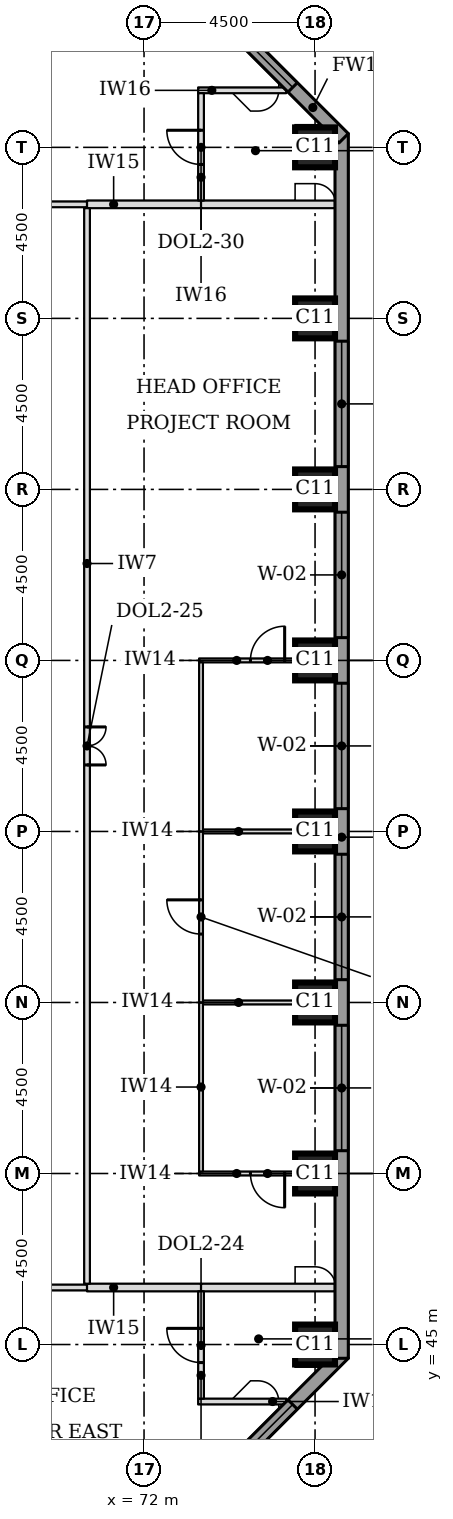
"""IFC4 building model, lengths in metres.
Left out: names, types, materials, properties, quantities, classifications, styles, units other than length and angle.
Written with IfcOpenShell. Run it as: python <this file> out.ifc"""

import sys

from ifc_helpers import new_model, si_unit, direction, frame, frame_2d, origin, origin_2d, place, context, subcontext, project, spatial, rectangle, extrude, element, fill, save


model = new_model("IFC4")
c1 = context("Model", 3, precision=1e-05, world=origin(), true_north=direction((0.0, 1.0)))
c2 = subcontext(c1, "Body", "Model", "MODEL_VIEW")
j1 = project(units=[si_unit("LENGTHUNIT", "METRE"), si_unit("PLANEANGLEUNIT", "RADIAN")], contexts=[c1])
p1 = place(None, origin())
s1 = spatial("IfcSite", under=j1, at=p1, CompositionType="ELEMENT")
p2 = place(p1, origin())
s2 = spatial("IfcBuilding", under=s1, at=p2, CompositionType="ELEMENT")
p3 = place(p2, frame((0.0, 0.0, 86.3)))
s3 = spatial("IfcBuildingStorey", under=s2, at=p3, CompositionType="ELEMENT", Elevation=86.3)
for number, where, z_axis, x_axis in (
    (1, (76.5, 45.0, 0.0), (0.0, 0.0, 1.0), (1.0, 0.0, 0.0)),
    (2, (76.5, 49.5, 0.0), (0.0, 0.0, 1.0), (1.0, 0.0, 0.0)),
    (3, (76.5, 54.0, 0.0), (0.0, 0.0, 1.0), (1.0, 0.0, 0.0)),
    (4, (76.5, 58.5, 0.0), (0.0, 0.0, 1.0), (1.0, 0.0, 0.0)),
    (5, (76.5, 63.0, 0.0), (0.0, 0.0, 1.0), (1.0, 0.0, 0.0)),
    (6, (76.5, 67.5, 0.0), (0.0, 0.0, 1.0), (1.0, 0.0, 0.0)),
    (7, (76.5, 72.0, 0.0), (0.0, 0.0, 1.0), (1.0, 0.0, 0.0)),
    (8, (76.5, 76.5, 0.0), (0.0, 0.0, 1.0), (1.0, 0.0, 0.0)),
):
    element("IfcColumn", number, at=place(p3, frame(where, z_axis=z_axis, x_axis=x_axis)), inside=s3, PredefinedType="COLUMN", context=c2, shape_type="SweptSolid", body=[
        extrude(rectangle(XDim=1.05, YDim=1.05, at=origin_2d()), origin(), (0.0, 0.0, 1.0), 3.7),
    ])
p4 = place(p3, frame((72.239, 39.749, 0.0), z_axis=(0.0, 0.0, 1.0), x_axis=(0.707106781187, 0.707106781187, 0.0)))
e9 = element("IfcWall", 9, at=p4, inside=s3, PredefinedType="STANDARD", context=c2, shape_type="SweptSolid", body=[
    extrude(rectangle(XDim=7.089, YDim=0.35, at=frame_2d((3.544, 0.0))), origin(), (0.0, 0.0, 1.0), 3.525),
])
p5 = place(p4, frame((1.894, 0.0, 0.9)))
e10 = element("IfcOpeningElement", 10, at=p5, cuts=e9, PredefinedType="OPENING", context=c2, shape_type="SweptSolid", body=[
    extrude(rectangle(XDim=3.3, YDim=1.9, at=frame_2d((1.65, 0.95))), frame((0.0, 0.185, 0.0), z_axis=(0.0, -1.0, 0.0), x_axis=(1.0, 0.0, 0.0)), (0.0, 0.0, 1.0), 0.37),
])
p6 = place(p3, frame((77.2, 44.638, 0.0), z_axis=(0.0, 0.0, 1.0), x_axis=(0.0, 1.0, 0.0)))
e11 = element("IfcWall", 11, at=p6, inside=s3, PredefinedType="STANDARD", context=c2, shape_type="SweptSolid", body=[
    extrude(rectangle(XDim=32.225, YDim=0.35, at=frame_2d((16.112, 0.0))), origin(), (0.0, 0.0, 1.0), 3.525),
])
p7 = place(p6, frame((5.462, 0.0, 0.9)))
e12 = element("IfcOpeningElement", 12, at=p7, cuts=e11, PredefinedType="OPENING", context=c2, shape_type="SweptSolid", body=[
    extrude(rectangle(XDim=3.3, YDim=1.9, at=frame_2d((1.65, 0.95))), frame((0.0, 0.185, 0.0), z_axis=(0.0, -1.0, 0.0), x_axis=(1.0, 0.0, 0.0)), (0.0, 0.0, 1.0), 0.37),
])
p8 = place(p6, frame((9.962, 0.0, 0.9)))
e13 = element("IfcOpeningElement", 13, at=p8, cuts=e11, PredefinedType="OPENING", context=c2, shape_type="SweptSolid", body=[
    extrude(rectangle(XDim=3.3, YDim=1.9, at=frame_2d((1.65, 0.95))), frame((0.0, 0.185, 0.0), z_axis=(0.0, -1.0, 0.0), x_axis=(1.0, 0.0, 0.0)), (0.0, 0.0, 1.0), 0.37),
])
p9 = place(p6, frame((14.462, 0.0, 0.9)))
e14 = element("IfcOpeningElement", 14, at=p9, cuts=e11, PredefinedType="OPENING", context=c2, shape_type="SweptSolid", body=[
    extrude(rectangle(XDim=3.3, YDim=1.9, at=frame_2d((1.65, 0.95))), frame((0.0, 0.185, 0.0), z_axis=(0.0, -1.0, 0.0), x_axis=(1.0, 0.0, 0.0)), (0.0, 0.0, 1.0), 0.37),
])
p10 = place(p6, frame((18.962, 0.0, 0.9)))
e15 = element("IfcOpeningElement", 15, at=p10, cuts=e11, PredefinedType="OPENING", context=c2, shape_type="SweptSolid", body=[
    extrude(rectangle(XDim=3.3, YDim=1.9, at=frame_2d((1.65, 0.95))), frame((0.0, 0.185, 0.0), z_axis=(0.0, -1.0, 0.0), x_axis=(1.0, 0.0, 0.0)), (0.0, 0.0, 1.0), 0.37),
])
p11 = place(p6, frame((23.462, 0.0, 0.9)))
e16 = element("IfcOpeningElement", 16, at=p11, cuts=e11, PredefinedType="OPENING", context=c2, shape_type="SweptSolid", body=[
    extrude(rectangle(XDim=3.3, YDim=1.9, at=frame_2d((1.65, 0.95))), frame((0.0, 0.185, 0.0), z_axis=(0.0, -1.0, 0.0), x_axis=(1.0, 0.0, 0.0)), (0.0, 0.0, 1.0), 0.37),
])
p12 = place(p3, frame((77.251, 76.739, 0.0), z_axis=(0.0, 0.0, 1.0), x_axis=(-0.707106781187, 0.707106781187, 0.0)))
e17 = element("IfcWall", 17, at=p12, inside=s3, PredefinedType="STANDARD", context=c2, shape_type="SweptSolid", body=[
    extrude(rectangle(XDim=7.089, YDim=0.35, at=frame_2d((3.544, 0.0))), origin(), (0.0, 0.0, 1.0), 3.525),
])
p13 = place(p12, frame((1.894, 0.0, 0.9)))
e18 = element("IfcOpeningElement", 18, at=p13, cuts=e17, PredefinedType="OPENING", context=c2, shape_type="SweptSolid", body=[
    extrude(rectangle(XDim=3.3, YDim=1.9, at=frame_2d((1.65, 0.95))), frame((0.0, 0.185, 0.0), z_axis=(0.0, -1.0, 0.0), x_axis=(1.0, 0.0, 0.0)), (0.0, 0.0, 1.0), 0.37),
])
p14 = place(p3, frame((73.425, 43.5, 0.0), z_axis=(0.0, 0.0, 1.0), x_axis=(1.0, 0.0, 0.0)))
e19 = element("IfcWall", 19, at=p14, inside=s3, PredefinedType="PARTITIONING", context=c2, shape_type="SweptSolid", body=[
    extrude(rectangle(XDim=2.317, YDim=0.15, at=frame_2d((1.159, 0.0))), origin(), (0.0, 0.0, 1.0), 3.55),
])
p15 = place(p3, frame((60.0, 46.5, 0.0), z_axis=(0.0, 0.0, 1.0), x_axis=(1.0, 0.0, 0.0)))
e20 = element("IfcWall", 20, at=p15, inside=s3, PredefinedType="PARTITIONING", context=c2, shape_type="SweptSolid", body=[
    extrude(rectangle(XDim=10.5, YDim=0.15, at=frame_2d((5.25, 0.0))), origin(), (0.0, 0.0, 1.0), 3.55),
])
p16 = place(p3, frame((70.5, 46.5, 0.0), z_axis=(0.0, 0.0, 1.0), x_axis=(1.0, 0.0, 0.0)))
e21 = element("IfcWall", 21, at=p16, inside=s3, PredefinedType="PARTITIONING", context=c2, shape_type="SweptSolid", body=[
    extrude(rectangle(XDim=3.0, YDim=0.2, at=frame_2d((1.5, 0.0))), origin(), (0.0, 0.0, 1.0), 3.55),
])
p17 = place(p3, frame((73.5, 46.5, 0.0), z_axis=(0.0, 0.0, 1.0), x_axis=(1.0, 0.0, 0.0)))
e22 = element("IfcWall", 22, at=p17, inside=s3, PredefinedType="PARTITIONING", context=c2, shape_type="SweptSolid", body=[
    extrude(rectangle(XDim=3.525, YDim=0.2, at=frame_2d((1.762, 0.0))), origin(), (0.0, 0.0, 1.0), 3.55),
])
p18 = place(p3, frame((73.45, 49.5, 0.0), z_axis=(0.0, 0.0, 1.0), x_axis=(1.0, 0.0, 0.0)))
e23 = element("IfcWall", 23, at=p18, inside=s3, PredefinedType="PARTITIONING", context=c2, shape_type="SweptSolid", body=[
    extrude(rectangle(XDim=3.575, YDim=0.1, at=frame_2d((1.788, 0.0))), origin(), (0.0, 0.0, 1.0), 3.55),
])
p19 = place(p18, frame((1.35, 0.0, 0.0)))
e24 = element("IfcOpeningElement", 24, at=p19, cuts=e23, PredefinedType="OPENING", context=c2, shape_type="SweptSolid", body=[
    extrude(rectangle(XDim=0.9, YDim=2.1, at=frame_2d((0.45, 1.05))), frame((0.0, 0.06, 0.0), z_axis=(0.0, -1.0, 0.0), x_axis=(1.0, 0.0, 0.0)), (0.0, 0.0, 1.0), 0.12),
])
for number, where, z_axis, x_axis in (
    (25, (73.55, 54.0, 0.0), (0.0, 0.0, 1.0), (1.0, 0.0, 0.0)),
    (26, (73.55, 58.5, 0.0), (0.0, 0.0, 1.0), (1.0, 0.0, 0.0)),
):
    element("IfcWall", number, at=place(p3, frame(where, z_axis=z_axis, x_axis=x_axis)), inside=s3, PredefinedType="PARTITIONING", context=c2, shape_type="SweptSolid", body=[
        extrude(rectangle(XDim=3.475, YDim=0.1, at=frame_2d((1.737, 0.0))), origin(), (0.0, 0.0, 1.0), 3.55),
    ])
p20 = place(p3, frame((73.45, 63.0, 0.0), z_axis=(0.0, 0.0, 1.0), x_axis=(1.0, 0.0, 0.0)))
e27 = element("IfcWall", 27, at=p20, inside=s3, PredefinedType="PARTITIONING", context=c2, shape_type="SweptSolid", body=[
    extrude(rectangle(XDim=3.575, YDim=0.1, at=frame_2d((1.788, 0.0))), origin(), (0.0, 0.0, 1.0), 3.55),
])
p21 = place(p20, frame((1.35, 0.0, 0.0)))
e28 = element("IfcOpeningElement", 28, at=p21, cuts=e27, PredefinedType="OPENING", context=c2, shape_type="SweptSolid", body=[
    extrude(rectangle(XDim=0.9, YDim=2.1, at=frame_2d((0.45, 1.05))), frame((0.0, 0.06, 0.0), z_axis=(0.0, -1.0, 0.0), x_axis=(1.0, 0.0, 0.0)), (0.0, 0.0, 1.0), 0.12),
])
p22 = place(p3, frame((46.5, 75.0, 0.0), z_axis=(0.0, 0.0, 1.0), x_axis=(1.0, 0.0, 0.0)))
e29 = element("IfcWall", 29, at=p22, inside=s3, PredefinedType="PARTITIONING", context=c2, shape_type="SweptSolid", body=[
    extrude(rectangle(XDim=24.0, YDim=0.15, at=frame_2d((12.0, 0.0))), origin(), (0.0, 0.0, 1.0), 3.55),
])
p23 = place(p3, frame((70.5, 75.0, 0.0), z_axis=(0.0, 0.0, 1.0), x_axis=(1.0, 0.0, 0.0)))
e30 = element("IfcWall", 30, at=p23, inside=s3, PredefinedType="PARTITIONING", context=c2, shape_type="SweptSolid", body=[
    extrude(rectangle(XDim=3.0, YDim=0.2, at=frame_2d((1.5, 0.0))), origin(), (0.0, 0.0, 1.0), 3.55),
])
p24 = place(p3, frame((73.5, 75.0, 0.0), z_axis=(0.0, 0.0, 1.0), x_axis=(1.0, 0.0, 0.0)))
e31 = element("IfcWall", 31, at=p24, inside=s3, PredefinedType="PARTITIONING", context=c2, shape_type="SweptSolid", body=[
    extrude(rectangle(XDim=3.525, YDim=0.2, at=frame_2d((1.762, 0.0))), origin(), (0.0, 0.0, 1.0), 3.55),
])
p25 = place(p3, frame((73.425, 78.0, 0.0), z_axis=(0.0, 0.0, 1.0), x_axis=(1.0, 0.0, 0.0)))
e32 = element("IfcWall", 32, at=p25, inside=s3, PredefinedType="PARTITIONING", context=c2, shape_type="SweptSolid", body=[
    extrude(rectangle(XDim=2.317, YDim=0.15, at=frame_2d((1.159, 0.0))), origin(), (0.0, 0.0, 1.0), 3.55),
])
p26 = place(p3, frame((73.5, 43.575, 0.0), z_axis=(0.0, 0.0, 1.0), x_axis=(0.0, 1.0, 0.0)))
e33 = element("IfcWall", 33, at=p26, inside=s3, PredefinedType="PARTITIONING", context=c2, shape_type="SweptSolid", body=[
    extrude(rectangle(XDim=2.825, YDim=0.15, at=frame_2d((1.413, 0.0))), origin(), (0.0, 0.0, 1.0), 3.55),
])
p27 = place(p26, frame((0.95, 0.0, 0.0)))
e34 = element("IfcOpeningElement", 34, at=p27, cuts=e33, PredefinedType="OPENING", context=c2, shape_type="SweptSolid", body=[
    extrude(rectangle(XDim=0.9, YDim=2.1, at=frame_2d((0.45, 1.05))), frame((0.0, 0.085, 0.0), z_axis=(0.0, -1.0, 0.0), x_axis=(1.0, 0.0, 0.0)), (0.0, 0.0, 1.0), 0.17),
])
p28 = place(p3, frame((70.5, 46.6, 0.0), z_axis=(0.0, 0.0, 1.0), x_axis=(0.0, 1.0, 0.0)))
e35 = element("IfcWall", 35, at=p28, inside=s3, PredefinedType="PARTITIONING", context=c2, shape_type="SweptSolid", body=[
    extrude(rectangle(XDim=28.3, YDim=0.15, at=frame_2d((14.15, 0.0))), origin(), (0.0, 0.0, 1.0), 3.55),
])
p29 = place(p28, frame((13.65, 0.0, 0.0)))
e36 = element("IfcOpeningElement", 36, at=p29, cuts=e35, PredefinedType="OPENING", context=c2, shape_type="SweptSolid", body=[
    extrude(rectangle(XDim=1.0, YDim=2.1, at=frame_2d((0.5, 1.05))), frame((0.0, 0.085, 0.0), z_axis=(0.0, -1.0, 0.0), x_axis=(1.0, 0.0, 0.0)), (0.0, 0.0, 1.0), 0.17),
])
p30 = place(p3, frame((73.5, 49.55, 0.0), z_axis=(0.0, 0.0, 1.0), x_axis=(0.0, 1.0, 0.0)))
e37 = element("IfcWall", 37, at=p30, inside=s3, PredefinedType="PARTITIONING", context=c2, shape_type="SweptSolid", body=[
    extrude(rectangle(XDim=4.45, YDim=0.1, at=frame_2d((2.225, 0.0))), origin(), (0.0, 0.0, 1.0), 3.55),
])
p31 = place(p3, frame((73.5, 54.0, 0.0), z_axis=(0.0, 0.0, 1.0), x_axis=(0.0, 1.0, 0.0)))
e38 = element("IfcWall", 38, at=p31, inside=s3, PredefinedType="PARTITIONING", context=c2, shape_type="SweptSolid", body=[
    extrude(rectangle(XDim=4.5, YDim=0.1, at=frame_2d((2.25, 0.0))), origin(), (0.0, 0.0, 1.0), 3.55),
])
p32 = place(p31, frame((1.8, 0.0, 0.0)))
e39 = element("IfcOpeningElement", 39, at=p32, cuts=e38, PredefinedType="OPENING", context=c2, shape_type="SweptSolid", body=[
    extrude(rectangle(XDim=0.9, YDim=2.1, at=frame_2d((0.45, 1.05))), frame((0.0, 0.06, 0.0), z_axis=(0.0, -1.0, 0.0), x_axis=(1.0, 0.0, 0.0)), (0.0, 0.0, 1.0), 0.12),
])
p33 = place(p3, frame((73.5, 58.5, 0.0), z_axis=(0.0, 0.0, 1.0), x_axis=(0.0, 1.0, 0.0)))
e40 = element("IfcWall", 40, at=p33, inside=s3, PredefinedType="PARTITIONING", context=c2, shape_type="SweptSolid", body=[
    extrude(rectangle(XDim=4.45, YDim=0.1, at=frame_2d((2.225, 0.0))), origin(), (0.0, 0.0, 1.0), 3.55),
])
p34 = place(p3, frame((73.5, 75.1, 0.0), z_axis=(0.0, 0.0, 1.0), x_axis=(0.0, 1.0, 0.0)))
e41 = element("IfcWall", 41, at=p34, inside=s3, PredefinedType="PARTITIONING", context=c2, shape_type="SweptSolid", body=[
    extrude(rectangle(XDim=2.825, YDim=0.15, at=frame_2d((1.413, 0.0))), origin(), (0.0, 0.0, 1.0), 3.55),
])
p35 = place(p34, frame((0.95, 0.0, 0.0)))
e42 = element("IfcOpeningElement", 42, at=p35, cuts=e41, PredefinedType="OPENING", context=c2, shape_type="SweptSolid", body=[
    extrude(rectangle(XDim=0.9, YDim=2.1, at=frame_2d((0.45, 1.05))), frame((0.0, 0.085, 0.0), z_axis=(0.0, -1.0, 0.0), x_axis=(1.0, 0.0, 0.0)), (0.0, 0.0, 1.0), 0.17),
])
p36 = place(p5, origin())
e43 = element("IfcWindow", 43, at=p36, inside=s3, PartitioningType="SINGLE_PANEL", PredefinedType="WINDOW", context=c2, shape_type="SweptSolid", body=[
    extrude(rectangle(XDim=3.3, YDim=1.9, at=frame_2d((1.65, 0.95))), frame((0.0, 0.085, 0.0), z_axis=(0.0, -1.0, 0.0), x_axis=(1.0, 0.0, 0.0)), (0.0, 0.0, 1.0), 0.06),
])
fill(e10, e43)
p37 = place(p7, origin())
e44 = element("IfcWindow", 44, at=p37, inside=s3, PartitioningType="SINGLE_PANEL", PredefinedType="WINDOW", context=c2, shape_type="SweptSolid", body=[
    extrude(rectangle(XDim=3.3, YDim=1.9, at=frame_2d((1.65, 0.95))), frame((0.0, 0.085, 0.0), z_axis=(0.0, -1.0, 0.0), x_axis=(1.0, 0.0, 0.0)), (0.0, 0.0, 1.0), 0.06),
])
fill(e12, e44)
p38 = place(p8, origin())
e45 = element("IfcWindow", 45, at=p38, inside=s3, PartitioningType="SINGLE_PANEL", PredefinedType="WINDOW", context=c2, shape_type="SweptSolid", body=[
    extrude(rectangle(XDim=3.3, YDim=1.9, at=frame_2d((1.65, 0.95))), frame((0.0, 0.085, 0.0), z_axis=(0.0, -1.0, 0.0), x_axis=(1.0, 0.0, 0.0)), (0.0, 0.0, 1.0), 0.06),
])
fill(e13, e45)
p39 = place(p9, origin())
e46 = element("IfcWindow", 46, at=p39, inside=s3, PartitioningType="SINGLE_PANEL", PredefinedType="WINDOW", context=c2, shape_type="SweptSolid", body=[
    extrude(rectangle(XDim=3.3, YDim=1.9, at=frame_2d((1.65, 0.95))), frame((0.0, 0.085, 0.0), z_axis=(0.0, -1.0, 0.0), x_axis=(1.0, 0.0, 0.0)), (0.0, 0.0, 1.0), 0.06),
])
fill(e14, e46)
p40 = place(p10, origin())
e47 = element("IfcWindow", 47, at=p40, inside=s3, PartitioningType="SINGLE_PANEL", PredefinedType="WINDOW", context=c2, shape_type="SweptSolid", body=[
    extrude(rectangle(XDim=3.3, YDim=1.9, at=frame_2d((1.65, 0.95))), frame((0.0, 0.085, 0.0), z_axis=(0.0, -1.0, 0.0), x_axis=(1.0, 0.0, 0.0)), (0.0, 0.0, 1.0), 0.06),
])
fill(e15, e47)
p41 = place(p11, origin())
e48 = element("IfcWindow", 48, at=p41, inside=s3, PartitioningType="SINGLE_PANEL", PredefinedType="WINDOW", context=c2, shape_type="SweptSolid", body=[
    extrude(rectangle(XDim=3.3, YDim=1.9, at=frame_2d((1.65, 0.95))), frame((0.0, 0.085, 0.0), z_axis=(0.0, -1.0, 0.0), x_axis=(1.0, 0.0, 0.0)), (0.0, 0.0, 1.0), 0.06),
])
fill(e16, e48)
p42 = place(p13, origin())
e49 = element("IfcWindow", 49, at=p42, inside=s3, PartitioningType="SINGLE_PANEL", PredefinedType="WINDOW", context=c2, shape_type="SweptSolid", body=[
    extrude(rectangle(XDim=3.3, YDim=1.9, at=frame_2d((1.65, 0.95))), frame((0.0, 0.085, 0.0), z_axis=(0.0, -1.0, 0.0), x_axis=(1.0, 0.0, 0.0)), (0.0, 0.0, 1.0), 0.06),
])
fill(e18, e49)
p43 = place(p27, origin())
e50 = element("IfcDoor", 50, at=p43, inside=s3, OperationType="SINGLE_SWING_RIGHT", PredefinedType="DOOR", context=c2, shape_type="SweptSolid", body=[
    extrude(rectangle(XDim=0.9, YDim=2.1, at=frame_2d((0.45, 1.05))), frame((0.0, 0.025, 0.0), z_axis=(0.0, -1.0, 0.0), x_axis=(1.0, 0.0, 0.0)), (0.0, 0.0, 1.0), 0.05),
])
fill(e34, e50)
p44 = place(p29, frame((1.0, 0.0, 0.0), z_axis=(0.0, 0.0, 1.0), x_axis=(-1.0, 0.0, 0.0)))
e51 = element("IfcDoor", 51, at=p44, inside=s3, OperationType="DOUBLE_DOOR_SINGLE_SWING", PredefinedType="DOOR", context=c2, shape_type="SweptSolid", body=[
    extrude(rectangle(XDim=1.0, YDim=2.1, at=frame_2d((0.5, 1.05))), frame((0.0, 0.025, 0.0), z_axis=(0.0, -1.0, 0.0), x_axis=(1.0, 0.0, 0.0)), (0.0, 0.0, 1.0), 0.05),
])
fill(e36, e51)
p45 = place(p19, frame((0.9, 0.0, 0.0), z_axis=(0.0, 0.0, 1.0), x_axis=(-1.0, 0.0, 0.0)))
e52 = element("IfcDoor", 52, at=p45, inside=s3, OperationType="SINGLE_SWING_LEFT", PredefinedType="DOOR", context=c2, shape_type="SweptSolid", body=[
    extrude(rectangle(XDim=0.9, YDim=2.1, at=frame_2d((0.45, 1.05))), frame((0.0, 0.025, 0.0), z_axis=(0.0, -1.0, 0.0), x_axis=(1.0, 0.0, 0.0)), (0.0, 0.0, 1.0), 0.05),
])
fill(e24, e52)
p46 = place(p32, origin())
e53 = element("IfcDoor", 53, at=p46, inside=s3, OperationType="SINGLE_SWING_RIGHT", PredefinedType="DOOR", context=c2, shape_type="SweptSolid", body=[
    extrude(rectangle(XDim=0.9, YDim=2.1, at=frame_2d((0.45, 1.05))), frame((0.0, 0.025, 0.0), z_axis=(0.0, -1.0, 0.0), x_axis=(1.0, 0.0, 0.0)), (0.0, 0.0, 1.0), 0.05),
])
fill(e39, e53)
p47 = place(p21, origin())
e54 = element("IfcDoor", 54, at=p47, inside=s3, OperationType="SINGLE_SWING_RIGHT", PredefinedType="DOOR", context=c2, shape_type="SweptSolid", body=[
    extrude(rectangle(XDim=0.9, YDim=2.1, at=frame_2d((0.45, 1.05))), frame((0.0, 0.025, 0.0), z_axis=(0.0, -1.0, 0.0), x_axis=(1.0, 0.0, 0.0)), (0.0, 0.0, 1.0), 0.05),
])
fill(e28, e54)
p48 = place(p35, origin())
e55 = element("IfcDoor", 55, at=p48, inside=s3, OperationType="SINGLE_SWING_RIGHT", PredefinedType="DOOR", context=c2, shape_type="SweptSolid", body=[
    extrude(rectangle(XDim=0.9, YDim=2.1, at=frame_2d((0.45, 1.05))), frame((0.0, 0.025, 0.0), z_axis=(0.0, -1.0, 0.0), x_axis=(1.0, 0.0, 0.0)), (0.0, 0.0, 1.0), 0.05),
])
fill(e42, e55)
save(model, sys.argv[1])
